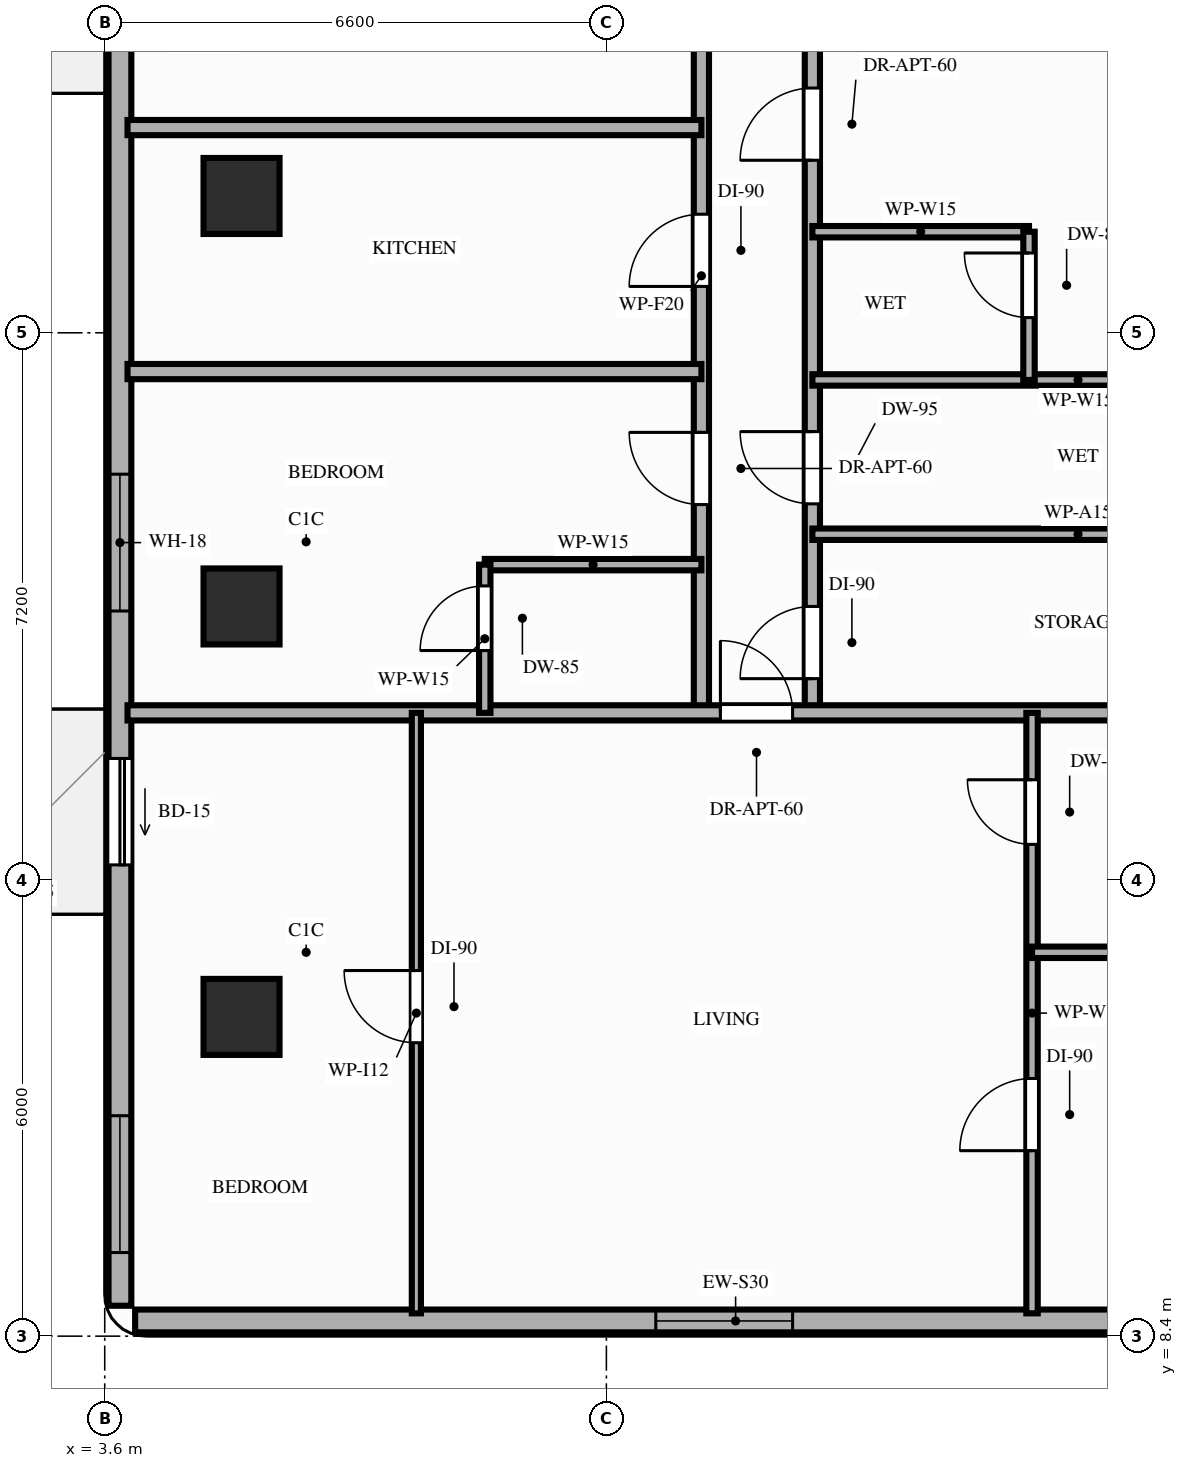
"""IFC4 building model, lengths in metres.
Left out: names, types, materials, properties, quantities, classifications, styles, units other than length and angle.
Written with IfcOpenShell. Run it as: python <this file> out.ifc"""

import sys

from ifc_helpers import new_model, si_unit, direction, frame, frame_2d, origin, origin_2d, place, context, subcontext, project, spatial, rectangle, extrude, element, fill, save


model = new_model("IFC4")
c1 = context("Model", 3, precision=1e-05, world=origin(), true_north=direction((0.0, 1.0)))
c2 = subcontext(c1, "Body", "Model", "MODEL_VIEW")
j1 = project(units=[si_unit("LENGTHUNIT", "METRE"), si_unit("PLANEANGLEUNIT", "RADIAN")], contexts=[c1])
p1 = place(None, origin())
s1 = spatial("IfcSite", under=j1, at=p1, CompositionType="ELEMENT")
p2 = place(p1, origin())
s2 = spatial("IfcBuilding", under=s1, at=p2, CompositionType="ELEMENT")
p3 = place(p2, frame((0.0, 0.0, 120.2)))
s3 = spatial("IfcBuildingStorey", under=s2, at=p3, CompositionType="ELEMENT", Elevation=120.2)
for number, where, z_axis, x_axis in (
    (1, (5.4, 12.6, 0.0), (0.0, 0.0, 1.0), (1.0, 0.0, 0.0)),
    (2, (5.4, 18.0, 0.0), (0.0, 0.0, 1.0), (1.0, 0.0, 0.0)),
    (3, (5.4, 23.4, 0.0), (0.0, 0.0, 1.0), (1.0, 0.0, 0.0)),
):
    element("IfcColumn", number, at=place(p3, frame(where, z_axis=z_axis, x_axis=x_axis)), inside=s3, PredefinedType="COLUMN", context=c2, shape_type="SweptSolid", body=[
        extrude(rectangle(XDim=1.0, YDim=1.0, at=origin_2d()), origin(), (0.0, 0.0, 1.0), 3.2),
    ])
p4 = place(p3, frame((4.0, 8.6, 0.0), z_axis=(0.0, 0.0, 1.0), x_axis=(1.0, 0.0, 0.0)))
e4 = element("IfcWall", 4, at=p4, inside=s3, PredefinedType="STANDARD", context=c2, shape_type="SweptSolid", body=[
    extrude(rectangle(XDim=15.8, YDim=0.3, at=frame_2d((7.9, 0.0))), origin(), (0.0, 0.0, 1.0), 3.02),
])
p5 = place(p4, frame((6.85, 0.0, 0.85)))
e5 = element("IfcOpeningElement", 5, at=p5, cuts=e4, PredefinedType="OPENING", context=c2, shape_type="SweptSolid", body=[
    extrude(rectangle(XDim=1.8, YDim=1.75, at=frame_2d((0.9, 0.875))), frame((0.0, 0.16, 0.0), z_axis=(0.0, -1.0, 0.0), x_axis=(1.0, 0.0, 0.0)), (0.0, 0.0, 1.0), 0.32),
])
p6 = place(p3, frame((3.8, 42.1, 0.0), z_axis=(0.0, 0.0, 1.0), x_axis=(0.0, -1.0, 0.0)))
e6 = element("IfcWall", 6, at=p6, inside=s3, PredefinedType="STANDARD", context=c2, shape_type="SweptSolid", body=[
    extrude(rectangle(XDim=33.3, YDim=0.3, at=frame_2d((16.65, 0.0))), origin(), (0.0, 0.0, 1.0), 2.71),
])
p7 = place(p6, frame((26.1, 0.0, 0.0)))
e7 = element("IfcOpeningElement", 7, at=p7, cuts=e6, PredefinedType="OPENING", context=c2, shape_type="SweptSolid", body=[
    extrude(rectangle(XDim=1.4, YDim=2.1, at=frame_2d((0.7, 1.05))), frame((0.0, 0.16, 0.0), z_axis=(0.0, -1.0, 0.0), x_axis=(1.0, 0.0, 0.0)), (0.0, 0.0, 1.0), 0.32),
])
p8 = place(p6, frame((15.3, 0.0, 0.0)))
e8 = element("IfcOpeningElement", 8, at=p8, cuts=e6, PredefinedType="OPENING", context=c2, shape_type="SweptSolid", body=[
    extrude(rectangle(XDim=1.4, YDim=2.1, at=frame_2d((0.7, 1.05))), frame((0.0, 0.16, 0.0), z_axis=(0.0, -1.0, 0.0), x_axis=(1.0, 0.0, 0.0)), (0.0, 0.0, 1.0), 0.32),
])
p9 = place(p6, frame((22.36, 0.0, 0.85)))
e9 = element("IfcOpeningElement", 9, at=p9, cuts=e6, PredefinedType="OPENING", context=c2, shape_type="SweptSolid", body=[
    extrude(rectangle(XDim=1.8, YDim=1.61, at=frame_2d((0.9, 0.805))), frame((0.0, 0.16, 0.0), z_axis=(0.0, -1.0, 0.0), x_axis=(1.0, 0.0, 0.0)), (0.0, 0.0, 1.0), 0.32),
])
p10 = place(p6, frame((30.8, 0.0, 0.85)))
e10 = element("IfcOpeningElement", 10, at=p10, cuts=e6, PredefinedType="OPENING", context=c2, shape_type="SweptSolid", body=[
    extrude(rectangle(XDim=1.8, YDim=1.61, at=frame_2d((0.9, 0.805))), frame((0.0, 0.16, 0.0), z_axis=(0.0, -1.0, 0.0), x_axis=(1.0, 0.0, 0.0)), (0.0, 0.0, 1.0), 0.32),
])
p11 = place(p6, frame((9.9, 0.0, 0.85)))
e11 = element("IfcOpeningElement", 11, at=p11, cuts=e6, PredefinedType="OPENING", context=c2, shape_type="SweptSolid", body=[
    extrude(rectangle(XDim=1.8, YDim=1.61, at=frame_2d((0.9, 0.805))), frame((0.0, 0.16, 0.0), z_axis=(0.0, -1.0, 0.0), x_axis=(1.0, 0.0, 0.0)), (0.0, 0.0, 1.0), 0.32),
])
p12 = place(p6, frame((3.8, 0.0, 0.85)))
e12 = element("IfcOpeningElement", 12, at=p12, cuts=e6, PredefinedType="OPENING", context=c2, shape_type="SweptSolid", body=[
    extrude(rectangle(XDim=1.8, YDim=1.61, at=frame_2d((0.9, 0.805))), frame((0.0, 0.16, 0.0), z_axis=(0.0, -1.0, 0.0), x_axis=(1.0, 0.0, 0.0)), (0.0, 0.0, 1.0), 0.32),
])
p13 = place(p3, frame((11.45, 16.6, 0.0), z_axis=(0.0, 0.0, 1.0), x_axis=(0.0, 1.0, 0.0)))
e13 = element("IfcWall", 13, at=p13, inside=s3, PredefinedType="PARTITIONING", context=c2, shape_type="SweptSolid", body=[
    extrude(rectangle(XDim=11.5, YDim=0.2, at=frame_2d((5.75, 0.0))), origin(), (0.0, 0.0, 1.0), 2.41),
])
p14 = place(p13, frame((2.74, 0.0, 0.0)))
e14 = element("IfcOpeningElement", 14, at=p14, cuts=e13, PredefinedType="OPENING", context=c2, shape_type="SweptSolid", body=[
    extrude(rectangle(XDim=0.95, YDim=2.15, at=frame_2d((0.475, 1.075))), frame((0.0, 0.11, 0.0), z_axis=(0.0, -1.0, 0.0), x_axis=(1.0, 0.0, 0.0)), (0.0, 0.0, 1.0), 0.22),
])
p15 = place(p13, frame((5.61, 0.0, 0.0)))
e15 = element("IfcOpeningElement", 15, at=p15, cuts=e13, PredefinedType="OPENING", context=c2, shape_type="SweptSolid", body=[
    extrude(rectangle(XDim=0.95, YDim=2.15, at=frame_2d((0.475, 1.075))), frame((0.0, 0.11, 0.0), z_axis=(0.0, -1.0, 0.0), x_axis=(1.0, 0.0, 0.0)), (0.0, 0.0, 1.0), 0.22),
])
p16 = place(p13, frame((9.12, 0.0, 0.0)))
e16 = element("IfcOpeningElement", 16, at=p16, cuts=e13, PredefinedType="OPENING", context=c2, shape_type="SweptSolid", body=[
    extrude(rectangle(XDim=0.95, YDim=2.15, at=frame_2d((0.475, 1.075))), frame((0.0, 0.11, 0.0), z_axis=(0.0, -1.0, 0.0), x_axis=(1.0, 0.0, 0.0)), (0.0, 0.0, 1.0), 0.22),
])
p17 = place(p3, frame((12.91, 16.6, 0.0), z_axis=(0.0, 0.0, 1.0), x_axis=(0.0, 1.0, 0.0)))
e17 = element("IfcWall", 17, at=p17, inside=s3, PredefinedType="PARTITIONING", context=c2, shape_type="SweptSolid", body=[
    extrude(rectangle(XDim=11.5, YDim=0.2, at=frame_2d((5.75, 0.0))), origin(), (0.0, 0.0, 1.0), 2.41),
])
p18 = place(p17, frame((0.45, 0.0, 0.0)))
e18 = element("IfcOpeningElement", 18, at=p18, cuts=e17, PredefinedType="OPENING", context=c2, shape_type="SweptSolid", body=[
    extrude(rectangle(XDim=0.95, YDim=2.15, at=frame_2d((0.475, 1.075))), frame((0.0, 0.11, 0.0), z_axis=(0.0, -1.0, 0.0), x_axis=(1.0, 0.0, 0.0)), (0.0, 0.0, 1.0), 0.22),
])
p19 = place(p17, frame((2.75, 0.0, 0.0)))
e19 = element("IfcOpeningElement", 19, at=p19, cuts=e17, PredefinedType="OPENING", context=c2, shape_type="SweptSolid", body=[
    extrude(rectangle(XDim=0.95, YDim=2.1, at=frame_2d((0.475, 1.05))), frame((0.0, 0.11, 0.0), z_axis=(0.0, -1.0, 0.0), x_axis=(1.0, 0.0, 0.0)), (0.0, 0.0, 1.0), 0.22),
])
p20 = place(p17, frame((9.86, 0.0, 0.0)))
e20 = element("IfcOpeningElement", 20, at=p20, cuts=e17, PredefinedType="OPENING", context=c2, shape_type="SweptSolid", body=[
    extrude(rectangle(XDim=0.95, YDim=2.15, at=frame_2d((0.475, 1.075))), frame((0.0, 0.11, 0.0), z_axis=(0.0, -1.0, 0.0), x_axis=(1.0, 0.0, 0.0)), (0.0, 0.0, 1.0), 0.22),
])
p21 = place(p17, frame((7.27, 0.0, 0.0)))
e21 = element("IfcOpeningElement", 21, at=p21, cuts=e17, PredefinedType="OPENING", context=c2, shape_type="SweptSolid", body=[
    extrude(rectangle(XDim=0.95, YDim=2.15, at=frame_2d((0.475, 1.075))), frame((0.0, 0.11, 0.0), z_axis=(0.0, -1.0, 0.0), x_axis=(1.0, 0.0, 0.0)), (0.0, 0.0, 1.0), 0.22),
])
p22 = place(p3, frame((3.9, 16.6, 0.0), z_axis=(0.0, 0.0, 1.0), x_axis=(1.0, 0.0, 0.0)))
e22 = element("IfcWall", 22, at=p22, inside=s3, PredefinedType="PARTITIONING", context=c2, shape_type="SweptSolid", body=[
    extrude(rectangle(XDim=16.0, YDim=0.2, at=frame_2d((8.0, 0.0))), origin(), (0.0, 0.0, 1.0), 2.41),
])
p23 = place(p22, frame((7.8, 0.0, 0.0)))
e23 = element("IfcOpeningElement", 23, at=p23, cuts=e22, PredefinedType="OPENING", context=c2, shape_type="SweptSolid", body=[
    extrude(rectangle(XDim=0.95, YDim=2.15, at=frame_2d((0.475, 1.075))), frame((0.0, 0.11, 0.0), z_axis=(0.0, -1.0, 0.0), x_axis=(1.0, 0.0, 0.0)), (0.0, 0.0, 1.0), 0.22),
])
p24 = place(p3, frame((8.6, 18.55, 0.0), z_axis=(0.0, 0.0, 1.0), x_axis=(1.0, 0.0, 0.0)))
e24 = element("IfcWall", 24, at=p24, inside=s3, PredefinedType="PARTITIONING", context=c2, shape_type="SweptSolid", body=[
    extrude(rectangle(XDim=2.85, YDim=0.15, at=frame_2d((1.425, 0.0))), origin(), (0.0, 0.0, 1.0), 3.02),
])
p25 = place(p3, frame((8.6, 16.6, 0.0), z_axis=(0.0, 0.0, 1.0), x_axis=(0.0, 1.0, 0.0)))
e25 = element("IfcWall", 25, at=p25, inside=s3, PredefinedType="PARTITIONING", context=c2, shape_type="SweptSolid", body=[
    extrude(rectangle(XDim=1.95, YDim=0.15, at=frame_2d((0.975, 0.0))), origin(), (0.0, 0.0, 1.0), 2.41),
])
p26 = place(p25, frame((0.82, 0.0, 0.0)))
e26 = element("IfcOpeningElement", 26, at=p26, cuts=e25, PredefinedType="OPENING", context=c2, shape_type="SweptSolid", body=[
    extrude(rectangle(XDim=0.85, YDim=2.1, at=frame_2d((0.425, 1.05))), frame((0.0, 0.085, 0.0), z_axis=(0.0, -1.0, 0.0), x_axis=(1.0, 0.0, 0.0)), (0.0, 0.0, 1.0), 0.17),
])
for number, where, z_axis, x_axis in (
    (27, (3.9, 21.09, 0.0), (0.0, 0.0, 1.0), (1.0, 0.0, 0.0)),
    (28, (3.9, 24.3, 0.0), (0.0, 0.0, 1.0), (1.0, 0.0, 0.0)),
):
    element("IfcWall", number, at=place(p3, frame(where, z_axis=z_axis, x_axis=x_axis)), inside=s3, PredefinedType="PARTITIONING", context=c2, shape_type="SweptSolid", body=[
        extrude(rectangle(XDim=7.55, YDim=0.2, at=frame_2d((3.775, 0.0))), origin(), (0.0, 0.0, 1.0), 2.41),
    ])
p27 = place(p3, frame((7.7, 8.7, 0.0), z_axis=(0.0, 0.0, 1.0), x_axis=(0.0, 1.0, 0.0)))
e29 = element("IfcWall", 29, at=p27, inside=s3, PredefinedType="PARTITIONING", context=c2, shape_type="SweptSolid", body=[
    extrude(rectangle(XDim=7.9, YDim=0.12, at=frame_2d((3.95, 0.0))), origin(), (0.0, 0.0, 1.0), 2.41),
])
p28 = place(p27, frame((3.56, 0.0, 0.0)))
e30 = element("IfcOpeningElement", 30, at=p28, cuts=e29, PredefinedType="OPENING", context=c2, shape_type="SweptSolid", body=[
    extrude(rectangle(XDim=0.95, YDim=2.15, at=frame_2d((0.475, 1.075))), frame((0.0, 0.07, 0.0), z_axis=(0.0, -1.0, 0.0), x_axis=(1.0, 0.0, 0.0)), (0.0, 0.0, 1.0), 0.14),
])
p29 = place(p3, frame((15.8, 8.7, 0.0), z_axis=(0.0, 0.0, 1.0), x_axis=(0.0, 1.0, 0.0)))
e31 = element("IfcWall", 31, at=p29, inside=s3, PredefinedType="PARTITIONING", context=c2, shape_type="SweptSolid", body=[
    extrude(rectangle(XDim=7.9, YDim=0.15, at=frame_2d((3.95, 0.0))), origin(), (0.0, 0.0, 1.0), 2.41),
])
p30 = place(p29, frame((2.14, 0.0, 0.0)))
e32 = element("IfcOpeningElement", 32, at=p30, cuts=e31, PredefinedType="OPENING", context=c2, shape_type="SweptSolid", body=[
    extrude(rectangle(XDim=0.95, YDim=2.15, at=frame_2d((0.475, 1.075))), frame((0.0, 0.085, 0.0), z_axis=(0.0, -1.0, 0.0), x_axis=(1.0, 0.0, 0.0)), (0.0, 0.0, 1.0), 0.17),
])
p31 = place(p29, frame((6.17, 0.0, 0.0)))
e33 = element("IfcOpeningElement", 33, at=p31, cuts=e31, PredefinedType="OPENING", context=c2, shape_type="SweptSolid", body=[
    extrude(rectangle(XDim=0.85, YDim=2.1, at=frame_2d((0.425, 1.05))), frame((0.0, 0.085, 0.0), z_axis=(0.0, -1.0, 0.0), x_axis=(1.0, 0.0, 0.0)), (0.0, 0.0, 1.0), 0.17),
])
p32 = place(p3, frame((15.8, 13.45, 0.0), z_axis=(0.0, 0.0, 1.0), x_axis=(1.0, 0.0, 0.0)))
e34 = element("IfcWall", 34, at=p32, inside=s3, PredefinedType="PARTITIONING", context=c2, shape_type="SweptSolid", body=[
    extrude(rectangle(XDim=4.1, YDim=0.15, at=frame_2d((2.05, 0.0))), origin(), (0.0, 0.0, 1.0), 2.41),
])
for number, where, z_axis, x_axis in (
    (35, (12.91, 18.95, 0.0), (0.0, 0.0, 1.0), (1.0, 0.0, 0.0)),
    (36, (12.91, 20.98, 0.0), (0.0, 0.0, 1.0), (1.0, 0.0, 0.0)),
):
    element("IfcWall", number, at=place(p3, frame(where, z_axis=z_axis, x_axis=x_axis)), inside=s3, PredefinedType="PARTITIONING", context=c2, shape_type="SweptSolid", body=[
        extrude(rectangle(XDim=6.99, YDim=0.15, at=frame_2d((3.495, 0.0))), origin(), (0.0, 0.0, 1.0), 2.41),
    ])
p33 = place(p3, frame((12.91, 22.93, 0.0), z_axis=(0.0, 0.0, 1.0), x_axis=(1.0, 0.0, 0.0)))
e37 = element("IfcWall", 37, at=p33, inside=s3, PredefinedType="PARTITIONING", context=c2, shape_type="SweptSolid", body=[
    extrude(rectangle(XDim=2.85, YDim=0.15, at=frame_2d((1.425, 0.0))), origin(), (0.0, 0.0, 1.0), 3.02),
])
p34 = place(p3, frame((15.76, 20.98, 0.0), z_axis=(0.0, 0.0, 1.0), x_axis=(0.0, 1.0, 0.0)))
e38 = element("IfcWall", 38, at=p34, inside=s3, PredefinedType="PARTITIONING", context=c2, shape_type="SweptSolid", body=[
    extrude(rectangle(XDim=1.95, YDim=0.15, at=frame_2d((0.975, 0.0))), origin(), (0.0, 0.0, 1.0), 2.6),
])
p35 = place(p34, frame((0.82, 0.0, 0.0)))
e39 = element("IfcOpeningElement", 39, at=p35, cuts=e38, PredefinedType="OPENING", context=c2, shape_type="SweptSolid", body=[
    extrude(rectangle(XDim=0.85, YDim=2.1, at=frame_2d((0.425, 1.05))), frame((0.0, 0.085, 0.0), z_axis=(0.0, -1.0, 0.0), x_axis=(1.0, 0.0, 0.0)), (0.0, 0.0, 1.0), 0.17),
])
p36 = place(p7, origin())
e40 = element("IfcDoor", 40, at=p36, inside=s3, OperationType="SLIDING_TO_RIGHT", PredefinedType="DOOR", context=c2, shape_type="SweptSolid", body=[
    extrude(rectangle(XDim=1.4, YDim=2.1, at=frame_2d((0.7, 1.05))), frame((0.0, 0.025, 0.0), z_axis=(0.0, -1.0, 0.0), x_axis=(1.0, 0.0, 0.0)), (0.0, 0.0, 1.0), 0.05),
])
fill(e7, e40)
p37 = place(p9, origin())
e41 = element("IfcWindow", 41, at=p37, inside=s3, PartitioningType="SINGLE_PANEL", PredefinedType="WINDOW", context=c2, shape_type="SweptSolid", body=[
    extrude(rectangle(XDim=1.8, YDim=1.61, at=frame_2d((0.9, 0.805))), frame((0.0, 0.03, 0.0), z_axis=(0.0, -1.0, 0.0), x_axis=(1.0, 0.0, 0.0)), (0.0, 0.0, 1.0), 0.06),
])
fill(e9, e41)
p38 = place(p5, origin())
e42 = element("IfcWindow", 42, at=p38, inside=s3, PartitioningType="SINGLE_PANEL", PredefinedType="WINDOW", context=c2, shape_type="SweptSolid", body=[
    extrude(rectangle(XDim=1.8, YDim=1.75, at=frame_2d((0.9, 0.875))), frame((0.0, 0.03, 0.0), z_axis=(0.0, -1.0, 0.0), x_axis=(1.0, 0.0, 0.0)), (0.0, 0.0, 1.0), 0.06),
])
fill(e5, e42)
p39 = place(p10, origin())
e43 = element("IfcWindow", 43, at=p39, inside=s3, PartitioningType="SINGLE_PANEL", PredefinedType="WINDOW", context=c2, shape_type="SweptSolid", body=[
    extrude(rectangle(XDim=1.8, YDim=1.61, at=frame_2d((0.9, 0.805))), frame((0.0, 0.03, 0.0), z_axis=(0.0, -1.0, 0.0), x_axis=(1.0, 0.0, 0.0)), (0.0, 0.0, 1.0), 0.06),
])
fill(e10, e43)
p40 = place(p26, origin())
e44 = element("IfcDoor", 44, at=p40, inside=s3, OperationType="SINGLE_SWING_LEFT", PredefinedType="DOOR", context=c2, shape_type="SweptSolid", body=[
    extrude(rectangle(XDim=0.85, YDim=2.1, at=frame_2d((0.425, 1.05))), frame((0.0, 0.025, 0.0), z_axis=(0.0, -1.0, 0.0), x_axis=(1.0, 0.0, 0.0)), (0.0, 0.0, 1.0), 0.05),
])
fill(e26, e44)
p41 = place(p14, origin())
e45 = element("IfcDoor", 45, at=p41, inside=s3, OperationType="SINGLE_SWING_RIGHT", PredefinedType="DOOR", context=c2, shape_type="SweptSolid", body=[
    extrude(rectangle(XDim=0.95, YDim=2.15, at=frame_2d((0.475, 1.075))), frame((0.0, 0.025, 0.0), z_axis=(0.0, -1.0, 0.0), x_axis=(1.0, 0.0, 0.0)), (0.0, 0.0, 1.0), 0.05),
])
fill(e14, e45)
p42 = place(p15, origin())
e46 = element("IfcDoor", 46, at=p42, inside=s3, OperationType="SINGLE_SWING_LEFT", PredefinedType="DOOR", context=c2, shape_type="SweptSolid", body=[
    extrude(rectangle(XDim=0.95, YDim=2.15, at=frame_2d((0.475, 1.075))), frame((0.0, 0.025, 0.0), z_axis=(0.0, -1.0, 0.0), x_axis=(1.0, 0.0, 0.0)), (0.0, 0.0, 1.0), 0.05),
])
fill(e15, e46)
p43 = place(p23, origin())
e47 = element("IfcDoor", 47, at=p43, inside=s3, OperationType="SINGLE_SWING_LEFT", PredefinedType="DOOR", context=c2, shape_type="SweptSolid", body=[
    extrude(rectangle(XDim=0.95, YDim=2.15, at=frame_2d((0.475, 1.075))), frame((0.0, 0.025, 0.0), z_axis=(0.0, -1.0, 0.0), x_axis=(1.0, 0.0, 0.0)), (0.0, 0.0, 1.0), 0.05),
])
fill(e23, e47)
p44 = place(p28, origin())
e48 = element("IfcDoor", 48, at=p44, inside=s3, OperationType="SINGLE_SWING_RIGHT", PredefinedType="DOOR", context=c2, shape_type="SweptSolid", body=[
    extrude(rectangle(XDim=0.95, YDim=2.15, at=frame_2d((0.475, 1.075))), frame((0.0, 0.025, 0.0), z_axis=(0.0, -1.0, 0.0), x_axis=(1.0, 0.0, 0.0)), (0.0, 0.0, 1.0), 0.05),
])
fill(e30, e48)
p45 = place(p30, origin())
e49 = element("IfcDoor", 49, at=p45, inside=s3, OperationType="SINGLE_SWING_LEFT", PredefinedType="DOOR", context=c2, shape_type="SweptSolid", body=[
    extrude(rectangle(XDim=0.95, YDim=2.15, at=frame_2d((0.475, 1.075))), frame((0.0, 0.025, 0.0), z_axis=(0.0, -1.0, 0.0), x_axis=(1.0, 0.0, 0.0)), (0.0, 0.0, 1.0), 0.05),
])
fill(e32, e49)
p46 = place(p31, origin())
e50 = element("IfcDoor", 50, at=p46, inside=s3, OperationType="SINGLE_SWING_RIGHT", PredefinedType="DOOR", context=c2, shape_type="SweptSolid", body=[
    extrude(rectangle(XDim=0.85, YDim=2.1, at=frame_2d((0.425, 1.05))), frame((0.0, 0.025, 0.0), z_axis=(0.0, -1.0, 0.0), x_axis=(1.0, 0.0, 0.0)), (0.0, 0.0, 1.0), 0.05),
])
fill(e33, e50)
p47 = place(p18, origin())
e51 = element("IfcDoor", 51, at=p47, inside=s3, OperationType="SINGLE_SWING_LEFT", PredefinedType="DOOR", context=c2, shape_type="SweptSolid", body=[
    extrude(rectangle(XDim=0.95, YDim=2.15, at=frame_2d((0.475, 1.075))), frame((0.0, 0.025, 0.0), z_axis=(0.0, -1.0, 0.0), x_axis=(1.0, 0.0, 0.0)), (0.0, 0.0, 1.0), 0.05),
])
fill(e18, e51)
p48 = place(p19, origin())
e52 = element("IfcDoor", 52, at=p48, inside=s3, OperationType="SINGLE_SWING_RIGHT", PredefinedType="DOOR", context=c2, shape_type="SweptSolid", body=[
    extrude(rectangle(XDim=0.95, YDim=2.1, at=frame_2d((0.475, 1.05))), frame((0.0, 0.025, 0.0), z_axis=(0.0, -1.0, 0.0), x_axis=(1.0, 0.0, 0.0)), (0.0, 0.0, 1.0), 0.05),
])
fill(e19, e52)
p49 = place(p35, origin())
e53 = element("IfcDoor", 53, at=p49, inside=s3, OperationType="SINGLE_SWING_RIGHT", PredefinedType="DOOR", context=c2, shape_type="SweptSolid", body=[
    extrude(rectangle(XDim=0.85, YDim=2.1, at=frame_2d((0.425, 1.05))), frame((0.0, 0.025, 0.0), z_axis=(0.0, -1.0, 0.0), x_axis=(1.0, 0.0, 0.0)), (0.0, 0.0, 1.0), 0.05),
])
fill(e39, e53)
p50 = place(p21, origin())
e54 = element("IfcDoor", 54, at=p50, inside=s3, OperationType="SINGLE_SWING_LEFT", PredefinedType="DOOR", context=c2, shape_type="SweptSolid", body=[
    extrude(rectangle(XDim=0.95, YDim=2.15, at=frame_2d((0.475, 1.075))), frame((0.0, 0.025, 0.0), z_axis=(0.0, -1.0, 0.0), x_axis=(1.0, 0.0, 0.0)), (0.0, 0.0, 1.0), 0.05),
])
fill(e21, e54)
save(model, sys.argv[1])
